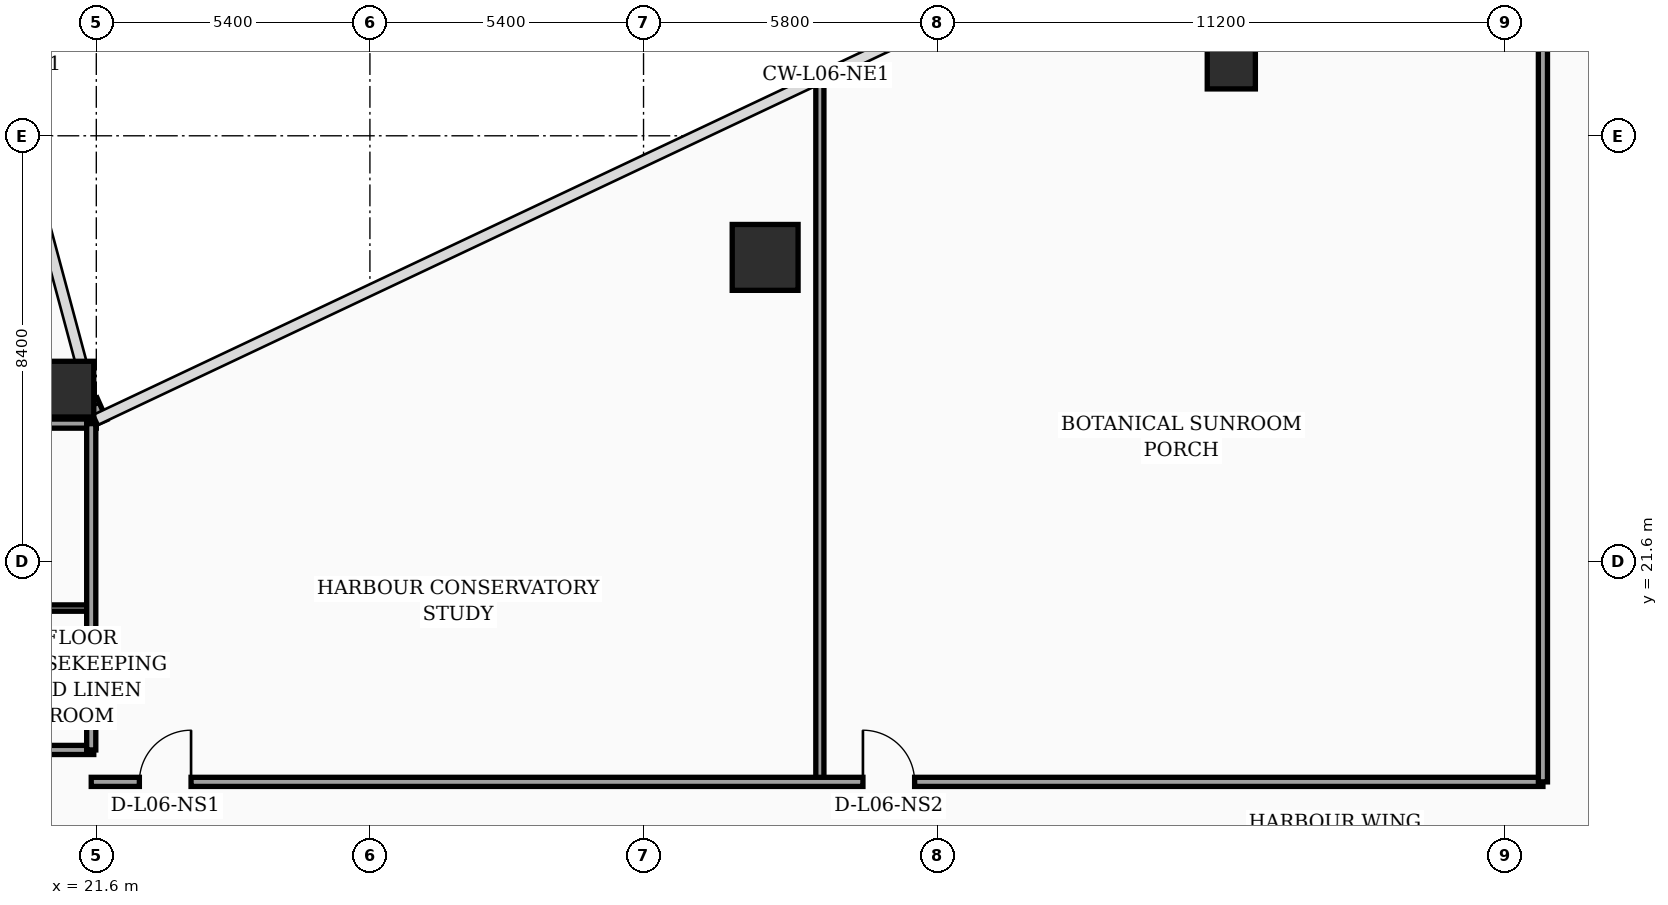
"""IFC4 building model, lengths in metres.
Left out: names, types, materials, properties, quantities, classifications, styles, units other than length and angle.
Written with IfcOpenShell. Run it as: python <this file> out.ifc"""

import sys

from ifc_helpers import new_model, si_unit, direction, frame, frame_2d, origin, origin_2d, place, context, subcontext, project, spatial, rectangle, hollow_rectangle, circle, extrude, element, fill, save


model = new_model("IFC4")
c1 = context("Model", 3, precision=1e-05, world=origin(), true_north=direction((0.0, 1.0)))
c2 = subcontext(c1, "Body", "Model", "MODEL_VIEW")
j1 = project(units=[si_unit("LENGTHUNIT", "METRE"), si_unit("PLANEANGLEUNIT", "RADIAN")], contexts=[c1])
p1 = place(None, origin())
s1 = spatial("IfcSite", under=j1, at=p1, CompositionType="ELEMENT")
p2 = place(p1, origin())
s2 = spatial("IfcBuilding", under=s1, at=p2, CompositionType="ELEMENT")
p3 = place(p2, frame((0.0, 0.0, 30.8)))
s3 = spatial("IfcBuildingStorey", under=s2, at=p3, CompositionType="ELEMENT", Elevation=30.8)
p4 = place(p3, frame((21.0, 25.0, 0.0), z_axis=(0.0, 0.0, 1.0), x_axis=(1.0, 0.0, 0.0)))
e1 = element("IfcColumn", 1, at=p4, inside=s3, PredefinedType="COLUMN", context=c2, shape_type="SweptSolid", body=[
    extrude(hollow_rectangle(XDim=1.1, YDim=1.1, WallThickness=0.045, at=origin_2d()), origin(), (0.0, 0.0, 1.0), 3.56),
])
p5 = place(p3, frame((34.8, 27.6, 0.0), z_axis=(0.0, 0.0, 1.0), x_axis=(1.0, 0.0, 0.0)))
e2 = element("IfcColumn", 2, at=p5, inside=s3, PredefinedType="COLUMN", context=c2, shape_type="SweptSolid", body=[
    extrude(circle(Radius=0.65, at=origin_2d()), origin(), (0.0, 0.0, 1.0), 3.56),
])
p6 = place(p3, frame((44.0, 31.4, 0.0), z_axis=(0.0, 0.0, 1.0), x_axis=(1.0, 0.0, 0.0)))
e3 = element("IfcColumn", 3, at=p6, inside=s3, PredefinedType="COLUMN", context=c2, shape_type="SweptSolid", body=[
    extrude(hollow_rectangle(XDim=0.95, YDim=0.95, WallThickness=0.04, at=origin_2d()), origin(), (0.0, 0.0, 1.0), 3.56),
])
p7 = place(p3, frame((21.68, 24.34, 0.0), z_axis=(0.0, 0.0, 1.0), x_axis=(-0.40758134973, 0.913168901875, 0.0)))
e4 = element("IfcWall", 4, at=p7, inside=s3, PredefinedType="SOLIDWALL", context=c2, shape_type="SweptSolid", body=[
    extrude(rectangle(XDim=0.471, YDim=0.28, at=frame_2d((0.235, 0.0))), origin(), (0.0, 0.0, 1.0), 3.56),
])
p8 = place(p3, frame((17.25, 17.88, 0.0), z_axis=(0.0, 0.0, 1.0), x_axis=(1.0, 0.0, 0.0)))
e5 = element("IfcWall", 5, at=p8, inside=s3, PredefinedType="PARTITIONING", context=c2, shape_type="SweptSolid", body=[
    extrude(rectangle(XDim=4.3, YDim=0.18, at=frame_2d((2.15, 0.0))), origin(), (0.0, 0.0, 1.0), 3.09),
])
p9 = place(p3, frame((17.25, 20.68, 0.0), z_axis=(0.0, 0.0, 1.0), x_axis=(1.0, 0.0, 0.0)))
e6 = element("IfcWall", 6, at=p9, inside=s3, PredefinedType="PARTITIONING", context=c2, shape_type="SweptSolid", body=[
    extrude(rectangle(XDim=4.3, YDim=0.125, at=frame_2d((2.15, 0.0))), origin(), (0.0, 0.0, 1.0), 3.56),
])
p10 = place(p3, frame((17.25, 24.32, 0.0), z_axis=(0.0, 0.0, 1.0), x_axis=(1.0, 0.0, 0.0)))
e7 = element("IfcWall", 7, at=p10, inside=s3, PredefinedType="PARTITIONING", context=c2, shape_type="SweptSolid", body=[
    extrude(rectangle(XDim=4.35, YDim=0.18, at=frame_2d((2.175, 0.0))), origin(), (0.0, 0.0, 1.0), 3.56),
])
p11 = place(p3, frame((21.5, 17.88, 0.0), z_axis=(0.0, 0.0, 1.0), x_axis=(0.0, 1.0, 0.0)))
e8 = element("IfcWall", 8, at=p11, inside=s3, PredefinedType="PARTITIONING", context=c2, shape_type="SweptSolid", body=[
    extrude(rectangle(XDim=6.44, YDim=0.18, at=frame_2d((3.22, 0.0))), origin(), (0.0, 0.0, 1.0), 3.09),
])
p12 = place(p3, frame((35.88, 17.25, 0.0), z_axis=(0.0, 0.0, 1.0), x_axis=(0.0, 1.0, 0.0)))
e9 = element("IfcWall", 9, at=p12, inside=s3, PredefinedType="PARTITIONING", context=c2, shape_type="SweptSolid", body=[
    extrude(rectangle(XDim=13.97, YDim=0.16, at=frame_2d((6.985, 0.0))), origin(), (0.0, 0.0, 1.0), 2.84),
])
p13 = place(p3, frame((21.5, 17.25, 0.0), z_axis=(0.0, 0.0, 1.0), x_axis=(1.0, 0.0, 0.0)))
e10 = element("IfcWall", 10, at=p13, inside=s3, PredefinedType="PARTITIONING", context=c2, shape_type="SweptSolid", body=[
    extrude(rectangle(XDim=28.65, YDim=0.18, at=frame_2d((14.325, 0.0))), origin(), (0.0, 0.0, 1.0), 2.84),
])
p14 = place(p13, frame((0.95, 0.0, 0.0)))
e11 = element("IfcOpeningElement", 11, at=p14, cuts=e10, PredefinedType="OPENING", context=c2, shape_type="SweptSolid", body=[
    extrude(rectangle(XDim=1.02, YDim=2.2, at=frame_2d((0.51, 1.1))), frame((0.0, 0.1, 0.0), z_axis=(0.0, -1.0, 0.0), x_axis=(1.0, 0.0, 0.0)), (0.0, 0.0, 1.0), 0.2),
])
p15 = place(p13, frame((15.23, 0.0, 0.0)))
e12 = element("IfcOpeningElement", 12, at=p15, cuts=e10, PredefinedType="OPENING", context=c2, shape_type="SweptSolid", body=[
    extrude(rectangle(XDim=1.02, YDim=2.2, at=frame_2d((0.51, 1.1))), frame((0.0, 0.1, 0.0), z_axis=(0.0, -1.0, 0.0), x_axis=(1.0, 0.0, 0.0)), (0.0, 0.0, 1.0), 0.2),
])
p16 = place(p3, frame((50.15, 17.25, 0.0), z_axis=(0.0, 0.0, 1.0), x_axis=(0.0, 1.0, 0.0)))
e13 = element("IfcWall", 13, at=p16, inside=s3, PredefinedType="PARTITIONING", context=c2, shape_type="SweptSolid", body=[
    extrude(rectangle(XDim=20.71, YDim=0.18, at=frame_2d((10.355, 0.0))), origin(), (0.0, 0.0, 1.0), 2.84),
])
p17 = place(p14, origin())
e14 = element("IfcDoor", 14, at=p17, inside=s3, OperationType="SINGLE_SWING_RIGHT", PredefinedType="DOOR", context=c2, shape_type="SweptSolid", body=[
    extrude(rectangle(XDim=1.02, YDim=2.2, at=frame_2d((0.51, 1.1))), frame((0.0, 0.025, 0.0), z_axis=(0.0, -1.0, 0.0), x_axis=(1.0, 0.0, 0.0)), (0.0, 0.0, 1.0), 0.05),
])
fill(e11, e14)
p18 = place(p15, origin())
e15 = element("IfcDoor", 15, at=p18, inside=s3, OperationType="SINGLE_SWING_LEFT", PredefinedType="DOOR", context=c2, shape_type="SweptSolid", body=[
    extrude(rectangle(XDim=1.02, YDim=2.2, at=frame_2d((0.51, 1.1))), frame((0.0, 0.025, 0.0), z_axis=(0.0, -1.0, 0.0), x_axis=(1.0, 0.0, 0.0)), (0.0, 0.0, 1.0), 0.05),
])
fill(e12, e15)
save(model, sys.argv[1])
